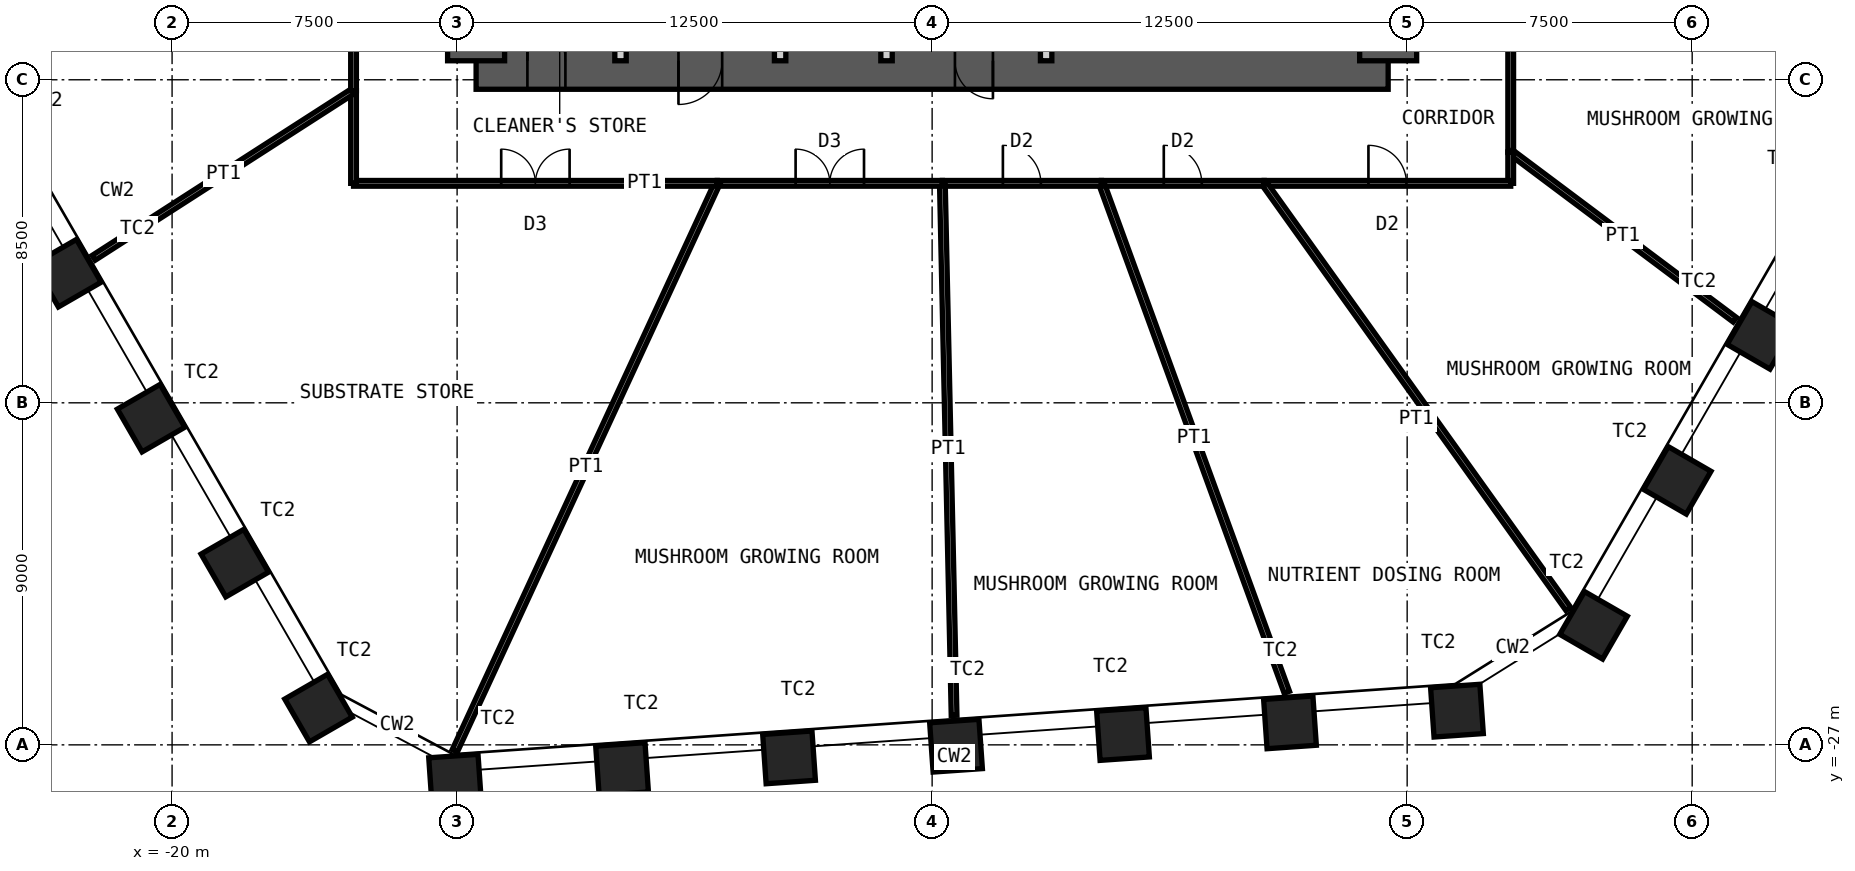
"""IFC4 building model, lengths in metres.
Left out: names, types, materials, properties, quantities, classifications, styles, units other than length and angle.
Written with IfcOpenShell. Run it as: python <this file> out.ifc"""

import sys

from ifc_helpers import new_model, si_unit, direction, frame, frame_2d, origin, origin_2d, place, context, subcontext, project, spatial, rectangle, hollow_rectangle, extrude, element, fill, save


model = new_model("IFC4")
c1 = context("Model", 3, precision=1e-05, world=origin(), true_north=direction((0.0, 1.0)))
c2 = subcontext(c1, "Body", "Model", "MODEL_VIEW")
j1 = project(units=[si_unit("LENGTHUNIT", "METRE"), si_unit("PLANEANGLEUNIT", "RADIAN")], contexts=[c1])
p1 = place(None, origin())
s1 = spatial("IfcSite", under=j1, at=p1, CompositionType="ELEMENT")
p2 = place(p1, origin())
s2 = spatial("IfcBuilding", under=s1, at=p2, CompositionType="ELEMENT")
p3 = place(p2, frame((0.0, 0.0, 62.0)))
s3 = spatial("IfcBuildingStorey", under=s2, at=p3, CompositionType="ELEMENT", Elevation=62.0)
for number, where, z_axis, x_axis in (
    (1, (21.809, -16.225, 0.0), (0.0, 0.0, 1.0), (0.5, 0.866, 0.0)),
    (2, (19.607, -20.04, 0.0), (0.0, 0.0, 1.0), (0.5, 0.866, 0.0)),
    (3, (17.405, -23.854, 0.0), (0.0, 0.0, 1.0), (0.5, 0.866, 0.0)),
    (4, (13.811, -26.1, 0.0), (0.0, 0.0, 1.0), (0.998, 0.07, 0.0)),
    (5, (9.417, -26.407, 0.0), (0.0, 0.0, 1.0), (0.998, 0.07, 0.0)),
    (6, (5.023, -26.715, 0.0), (0.0, 0.0, 1.0), (0.998, 0.07, 0.0)),
    (7, (0.629, -27.022, 0.0), (0.0, 0.0, 1.0), (0.998, 0.07, 0.0)),
    (8, (-3.765, -27.329, 0.0), (0.0, 0.0, 1.0), (0.998, 0.07, 0.0)),
    (9, (-8.159, -27.636, 0.0), (0.0, 0.0, 1.0), (0.998, 0.07, 0.0)),
    (10, (-12.553, -27.944, 0.0), (0.0, 0.0, 1.0), (0.998, 0.07, 0.0)),
    (11, (-16.147, -26.033, 0.0), (0.0, 0.0, 1.0), (0.5, -0.866, 0.0)),
    (12, (-18.349, -22.218, 0.0), (0.0, 0.0, 1.0), (0.5, -0.866, 0.0)),
    (13, (-20.552, -18.404, 0.0), (0.0, 0.0, 1.0), (0.5, -0.866, 0.0)),
    (14, (-22.754, -14.589, 0.0), (0.0, 0.0, 1.0), (0.5, -0.866, 0.0)),
):
    element("IfcColumn", number, at=place(p3, frame(where, z_axis=z_axis, x_axis=x_axis)), inside=s3, PredefinedType="COLUMN", context=c2, shape_type="SweptSolid", body=[
        extrude(hollow_rectangle(XDim=1.3, YDim=1.3, WallThickness=0.1, at=origin_2d()), origin(), (0.0, 0.0, 1.0), 5.0),
    ])
p4 = place(p3, frame((-12.0, -9.0, 0.0), z_axis=(0.0, 0.0, 1.0), x_axis=(1.0, 0.0, 0.0)))
e15 = element("IfcWall", 15, at=p4, inside=s3, PredefinedType="SHEAR", context=c2, shape_type="SweptSolid", body=[
    extrude(rectangle(XDim=24.0, YDim=1.5, at=frame_2d((12.0, 0.0))), origin(), (0.0, 0.0, 1.0), 5.0),
])
p5 = place(p4, frame((1.35, 0.0, 0.0)))
e16 = element("IfcOpeningElement", 16, at=p5, cuts=e15, PredefinedType="OPENING", context=c2, shape_type="SweptSolid", body=[
    extrude(rectangle(XDim=1.0, YDim=2.1, at=frame_2d((0.5, 1.05))), frame((0.0, 0.76, 0.0), z_axis=(0.0, -1.0, 0.0), x_axis=(1.0, 0.0, 0.0)), (0.0, 0.0, 1.0), 1.52),
])
p6 = place(p4, frame((5.325, 0.0, 0.0)))
e17 = element("IfcOpeningElement", 17, at=p6, cuts=e15, PredefinedType="OPENING", context=c2, shape_type="SweptSolid", body=[
    extrude(rectangle(XDim=1.15, YDim=2.1, at=frame_2d((0.575, 1.05))), frame((0.0, 0.76, 0.0), z_axis=(0.0, -1.0, 0.0), x_axis=(1.0, 0.0, 0.0)), (0.0, 0.0, 1.0), 1.52),
])
p7 = place(p4, frame((12.6, 0.0, 0.0)))
e18 = element("IfcOpeningElement", 18, at=p7, cuts=e15, PredefinedType="OPENING", context=c2, shape_type="SweptSolid", body=[
    extrude(rectangle(XDim=1.0, YDim=2.1, at=frame_2d((0.5, 1.05))), frame((0.0, 0.76, 0.0), z_axis=(0.0, -1.0, 0.0), x_axis=(1.0, 0.0, 0.0)), (0.0, 0.0, 1.0), 1.52),
])
p8 = place(p3, frame((12.0, -9.0, 0.0), z_axis=(0.0, 0.0, 1.0), x_axis=(0.0, 1.0, 0.0)))
e19 = element("IfcWall", 19, at=p8, inside=s3, PredefinedType="SHEAR", context=c2, shape_type="SweptSolid", body=[
    extrude(rectangle(XDim=18.0, YDim=1.5, at=frame_2d((9.0, 0.0))), origin(), (0.0, 0.0, 1.0), 5.0),
])
p9 = place(p8, frame((8.1, 0.0, 0.0)))
e20 = element("IfcOpeningElement", 20, at=p9, cuts=e19, PredefinedType="OPENING", context=c2, shape_type="SweptSolid", body=[
    extrude(rectangle(XDim=1.8, YDim=2.1, at=frame_2d((0.9, 1.05))), frame((0.0, 0.76, 0.0), z_axis=(0.0, -1.0, 0.0), x_axis=(1.0, 0.0, 0.0)), (0.0, 0.0, 1.0), 1.52),
])
p10 = place(p3, frame((-12.0, -9.0, 0.0), z_axis=(0.0, 0.0, 1.0), x_axis=(0.0, 1.0, 0.0)))
e21 = element("IfcWall", 21, at=p10, inside=s3, PredefinedType="SHEAR", context=c2, shape_type="SweptSolid", body=[
    extrude(rectangle(XDim=18.0, YDim=1.5, at=frame_2d((9.0, 0.0))), origin(), (0.0, 0.0, 1.0), 5.0),
])
p11 = place(p10, frame((8.1, 0.0, 0.0)))
e22 = element("IfcOpeningElement", 22, at=p11, cuts=e21, PredefinedType="OPENING", context=c2, shape_type="SweptSolid", body=[
    extrude(rectangle(XDim=1.8, YDim=2.1, at=frame_2d((0.9, 1.05))), frame((0.0, 0.76, 0.0), z_axis=(0.0, -1.0, 0.0), x_axis=(1.0, 0.0, 0.0)), (0.0, 0.0, 1.0), 1.52),
])
for number, where, z_axis, x_axis in (
    (23, (-8.2, -9.0, 0.0), (0.0, 0.0, 1.0), (0.0, 1.0, 0.0)),
    (24, (-4.0, -9.0, 0.0), (0.0, 0.0, 1.0), (0.0, 1.0, 0.0)),
):
    element("IfcWall", number, at=place(p3, frame(where, z_axis=z_axis, x_axis=x_axis)), inside=s3, PredefinedType="PARTITIONING", context=c2, shape_type="SweptSolid", body=[
        extrude(rectangle(XDim=3.85, YDim=0.3, at=frame_2d((1.925, 0.0))), origin(), (0.0, 0.0, 1.0), 4.78),
    ])
p12 = place(p3, frame((-1.2, -9.0, 0.0), z_axis=(0.0, 0.0, 1.0), x_axis=(0.0, 1.0, 0.0)))
e25 = element("IfcWall", 25, at=p12, inside=s3, PredefinedType="PARTITIONING", context=c2, shape_type="SweptSolid", body=[
    extrude(rectangle(XDim=3.85, YDim=0.3, at=frame_2d((1.925, 0.0))), origin(), (0.0, 0.0, 1.0), 4.78),
])
p13 = place(p12, frame((1.375, 0.0, 0.0)))
e26 = element("IfcOpeningElement", 26, at=p13, cuts=e25, PredefinedType="OPENING", context=c2, shape_type="SweptSolid", body=[
    extrude(rectangle(XDim=1.1, YDim=2.4, at=frame_2d((0.55, 1.2))), frame((0.0, 0.16, 0.0), z_axis=(0.0, -1.0, 0.0), x_axis=(1.0, 0.0, 0.0)), (0.0, 0.0, 1.0), 0.32),
])
p14 = place(p3, frame((3.0, -9.0, 0.0), z_axis=(0.0, 0.0, 1.0), x_axis=(0.0, 1.0, 0.0)))
e27 = element("IfcWall", 27, at=p14, inside=s3, PredefinedType="PARTITIONING", context=c2, shape_type="SweptSolid", body=[
    extrude(rectangle(XDim=3.85, YDim=0.3, at=frame_2d((1.925, 0.0))), origin(), (0.0, 0.0, 1.0), 4.78),
])
p15 = place(p14, frame((1.425, 0.0, 0.0)))
e28 = element("IfcOpeningElement", 28, at=p15, cuts=e27, PredefinedType="OPENING", context=c2, shape_type="SweptSolid", body=[
    extrude(rectangle(XDim=1.0, YDim=2.1, at=frame_2d((0.5, 1.05))), frame((0.0, 0.16, 0.0), z_axis=(0.0, -1.0, 0.0), x_axis=(1.0, 0.0, 0.0)), (0.0, 0.0, 1.0), 0.32),
])
p16 = place(p3, frame((15.225, -4.903, 0.0), z_axis=(0.0, 0.0, 1.0), x_axis=(0.0, -1.0, 0.0)))
e29 = element("IfcWall", 29, at=p16, inside=s3, PredefinedType="PARTITIONING", context=c2, shape_type="SweptSolid", body=[
    extrude(rectangle(XDim=6.497, YDim=0.15, at=frame_2d((3.248, 0.0))), origin(), (0.0, 0.0, 1.0), 4.8),
])
p17 = place(p16, frame((2.748, 0.0, 0.0)))
e30 = element("IfcOpeningElement", 30, at=p17, cuts=e29, PredefinedType="OPENING", context=c2, shape_type="SweptSolid", body=[
    extrude(rectangle(XDim=1.0, YDim=2.4, at=frame_2d((0.5, 1.2))), frame((0.0, 0.085, 0.0), z_axis=(0.0, -1.0, 0.0), x_axis=(1.0, 0.0, 0.0)), (0.0, 0.0, 1.0), 0.17),
])
p18 = place(p3, frame((21.123, -15.815, 0.0), z_axis=(0.0, 0.0, 1.0), x_axis=(-0.800484840692, 0.599353001012, 0.0)))
e31 = element("IfcWall", 31, at=p18, inside=s3, PredefinedType="PARTITIONING", context=c2, shape_type="SweptSolid", body=[
    extrude(rectangle(XDim=7.368, YDim=0.15, at=frame_2d((3.684, 0.0))), origin(), (0.0, 0.0, 1.0), 3.7),
])
p19 = place(p3, frame((15.225, -11.399, 0.0), z_axis=(0.0, 0.0, 1.0), x_axis=(0.0, -1.0, 0.0)))
e32 = element("IfcWall", 32, at=p19, inside=s3, PredefinedType="PARTITIONING", context=c2, shape_type="SweptSolid", body=[
    extrude(rectangle(XDim=0.826, YDim=0.15, at=frame_2d((0.413, 0.0))), origin(), (0.0, 0.0, 1.0), 4.8),
])
p20 = place(p3, frame((15.225, -12.225, 0.0), z_axis=(0.0, 0.0, 1.0), x_axis=(-1.0, 0.0, 0.0)))
e33 = element("IfcWall", 33, at=p20, inside=s3, PredefinedType="PARTITIONING", context=c2, shape_type="SweptSolid", body=[
    extrude(rectangle(XDim=6.488, YDim=0.15, at=frame_2d((3.244, 0.0))), origin(), (0.0, 0.0, 1.0), 4.8),
])
p21 = place(p20, frame((2.744, 0.0, 0.0)))
e34 = element("IfcOpeningElement", 34, at=p21, cuts=e33, PredefinedType="OPENING", context=c2, shape_type="SweptSolid", body=[
    extrude(rectangle(XDim=1.0, YDim=2.4, at=frame_2d((0.5, 1.2))), frame((0.0, 0.085, 0.0), z_axis=(0.0, -1.0, 0.0), x_axis=(1.0, 0.0, 0.0)), (0.0, 0.0, 1.0), 0.17),
])
p22 = place(p3, frame((16.74, -23.423, 0.0), z_axis=(0.0, 0.0, 1.0), x_axis=(-0.581459653783, 0.813575239927, 0.0)))
e35 = element("IfcWall", 35, at=p22, inside=s3, PredefinedType="PARTITIONING", context=c2, shape_type="SweptSolid", body=[
    extrude(rectangle(XDim=13.764, YDim=0.15, at=frame_2d((6.882, 0.0))), origin(), (0.0, 0.0, 1.0), 3.7),
])
p23 = place(p3, frame((8.737, -12.225, 0.0), z_axis=(0.0, 0.0, 1.0), x_axis=(-1.0, 0.0, 0.0)))
e36 = element("IfcWall", 36, at=p23, inside=s3, PredefinedType="PARTITIONING", context=c2, shape_type="SweptSolid", body=[
    extrude(rectangle(XDim=4.282, YDim=0.15, at=frame_2d((2.141, 0.0))), origin(), (0.0, 0.0, 1.0), 4.8),
])
p24 = place(p23, frame((1.641, 0.0, 0.0)))
e37 = element("IfcOpeningElement", 37, at=p24, cuts=e36, PredefinedType="OPENING", context=c2, shape_type="SweptSolid", body=[
    extrude(rectangle(XDim=1.0, YDim=2.4, at=frame_2d((0.5, 1.2))), frame((0.0, 0.085, 0.0), z_axis=(0.0, -1.0, 0.0), x_axis=(1.0, 0.0, 0.0)), (0.0, 0.0, 1.0), 0.17),
])
p25 = place(p3, frame((9.333, -25.615, 0.0), z_axis=(0.0, 0.0, 1.0), x_axis=(-0.342348208267, 0.939573150051, 0.0)))
e38 = element("IfcWall", 38, at=p25, inside=s3, PredefinedType="PARTITIONING", context=c2, shape_type="SweptSolid", body=[
    extrude(rectangle(XDim=14.251, YDim=0.15, at=frame_2d((7.125, 0.0))), origin(), (0.0, 0.0, 1.0), 3.7),
])
p26 = place(p3, frame((4.455, -12.225, 0.0), z_axis=(0.0, 0.0, 1.0), x_axis=(-1.0, 0.0, 0.0)))
e39 = element("IfcWall", 39, at=p26, inside=s3, PredefinedType="PARTITIONING", context=c2, shape_type="SweptSolid", body=[
    extrude(rectangle(XDim=4.185, YDim=0.15, at=frame_2d((2.093, 0.0))), origin(), (0.0, 0.0, 1.0), 4.8),
])
p27 = place(p26, frame((1.593, 0.0, 0.0)))
e40 = element("IfcOpeningElement", 40, at=p27, cuts=e39, PredefinedType="OPENING", context=c2, shape_type="SweptSolid", body=[
    extrude(rectangle(XDim=1.0, YDim=2.4, at=frame_2d((0.5, 1.2))), frame((0.0, 0.085, 0.0), z_axis=(0.0, -1.0, 0.0), x_axis=(1.0, 0.0, 0.0)), (0.0, 0.0, 1.0), 0.17),
])
p28 = place(p3, frame((0.578, -26.224, 0.0), z_axis=(0.0, 0.0, 1.0), x_axis=(-0.022039362711, 0.999757103746, 0.0)))
e41 = element("IfcWall", 41, at=p28, inside=s3, PredefinedType="PARTITIONING", context=c2, shape_type="SweptSolid", body=[
    extrude(rectangle(XDim=14.002, YDim=0.15, at=frame_2d((7.001, 0.0))), origin(), (0.0, 0.0, 1.0), 3.7),
])
p29 = place(p3, frame((0.269, -12.225, 0.0), z_axis=(0.0, 0.0, 1.0), x_axis=(-1.0, 0.0, 0.0)))
e42 = element("IfcWall", 42, at=p29, inside=s3, PredefinedType="PARTITIONING", context=c2, shape_type="SweptSolid", body=[
    extrude(rectangle(XDim=5.924, YDim=0.15, at=frame_2d((2.962, 0.0))), origin(), (0.0, 0.0, 1.0), 4.8),
])
p30 = place(p29, frame((2.062, 0.0, 0.0)))
e43 = element("IfcOpeningElement", 43, at=p30, cuts=e42, PredefinedType="OPENING", context=c2, shape_type="SweptSolid", body=[
    extrude(rectangle(XDim=1.8, YDim=2.4, at=frame_2d((0.9, 1.2))), frame((0.0, 0.085, 0.0), z_axis=(0.0, -1.0, 0.0), x_axis=(1.0, 0.0, 0.0)), (0.0, 0.0, 1.0), 0.17),
])
p31 = place(p3, frame((-12.56, -27.155, 0.0), z_axis=(0.0, 0.0, 1.0), x_axis=(0.419797833376, 0.907617639258, 0.0)))
e44 = element("IfcWall", 44, at=p31, inside=s3, PredefinedType="PARTITIONING", context=c2, shape_type="SweptSolid", body=[
    extrude(rectangle(XDim=16.449, YDim=0.15, at=frame_2d((8.225, 0.0))), origin(), (0.0, 0.0, 1.0), 3.7),
])
p32 = place(p3, frame((-5.654, -12.225, 0.0), z_axis=(0.0, 0.0, 1.0), x_axis=(-1.0, 0.0, 0.0)))
e45 = element("IfcWall", 45, at=p32, inside=s3, PredefinedType="PARTITIONING", context=c2, shape_type="SweptSolid", body=[
    extrude(rectangle(XDim=9.571, YDim=0.15, at=frame_2d((4.785, 0.0))), origin(), (0.0, 0.0, 1.0), 4.8),
])
p33 = place(p32, frame((3.885, 0.0, 0.0)))
e46 = element("IfcOpeningElement", 46, at=p33, cuts=e45, PredefinedType="OPENING", context=c2, shape_type="SweptSolid", body=[
    extrude(rectangle(XDim=1.8, YDim=2.4, at=frame_2d((0.9, 1.2))), frame((0.0, 0.085, 0.0), z_axis=(0.0, -1.0, 0.0), x_axis=(1.0, 0.0, 0.0)), (0.0, 0.0, 1.0), 0.17),
])
p34 = place(p3, frame((-15.225, -12.225, 0.0), z_axis=(0.0, 0.0, 1.0), x_axis=(0.0, 1.0, 0.0)))
e47 = element("IfcWall", 47, at=p34, inside=s3, PredefinedType="PARTITIONING", context=c2, shape_type="SweptSolid", body=[
    extrude(rectangle(XDim=2.437, YDim=0.15, at=frame_2d((1.218, 0.0))), origin(), (0.0, 0.0, 1.0), 4.8),
])
p35 = place(p3, frame((-22.063, -14.185, 0.0), z_axis=(0.0, 0.0, 1.0), x_axis=(0.8411570088, 0.540790982309, 0.0)))
e48 = element("IfcWall", 48, at=p35, inside=s3, PredefinedType="PARTITIONING", context=c2, shape_type="SweptSolid", body=[
    extrude(rectangle(XDim=8.13, YDim=0.15, at=frame_2d((4.065, 0.0))), origin(), (0.0, 0.0, 1.0), 3.7),
])
p36 = place(p3, frame((-15.225, -9.789, 0.0), z_axis=(0.0, 0.0, 1.0), x_axis=(0.0, 1.0, 0.0)))
e49 = element("IfcWall", 49, at=p36, inside=s3, PredefinedType="PARTITIONING", context=c2, shape_type="SweptSolid", body=[
    extrude(rectangle(XDim=8.308, YDim=0.15, at=frame_2d((4.154, 0.0))), origin(), (0.0, 0.0, 1.0), 4.8),
])
p37 = place(p36, frame((3.254, 0.0, 0.0)))
e50 = element("IfcOpeningElement", 50, at=p37, cuts=e49, PredefinedType="OPENING", context=c2, shape_type="SweptSolid", body=[
    extrude(rectangle(XDim=1.8, YDim=2.4, at=frame_2d((0.9, 1.2))), frame((0.0, 0.085, 0.0), z_axis=(0.0, -1.0, 0.0), x_axis=(1.0, 0.0, 0.0)), (0.0, 0.0, 1.0), 0.17),
])
p38 = place(p5, origin())
e51 = element("IfcDoor", 51, at=p38, inside=s3, OperationType="SINGLE_SWING_RIGHT", PredefinedType="DOOR", context=c2, shape_type="SweptSolid", body=[
    extrude(rectangle(XDim=1.0, YDim=2.1, at=frame_2d((0.5, 1.05))), frame((0.0, 0.025, 0.0), z_axis=(0.0, -1.0, 0.0), x_axis=(1.0, 0.0, 0.0)), (0.0, 0.0, 1.0), 0.05),
])
fill(e16, e51)
p39 = place(p6, origin())
e52 = element("IfcDoor", 52, at=p39, inside=s3, OperationType="SINGLE_SWING_LEFT", PredefinedType="DOOR", context=c2, shape_type="SweptSolid", body=[
    extrude(rectangle(XDim=1.15, YDim=2.1, at=frame_2d((0.575, 1.05))), frame((0.0, 0.025, 0.0), z_axis=(0.0, -1.0, 0.0), x_axis=(1.0, 0.0, 0.0)), (0.0, 0.0, 1.0), 0.05),
])
fill(e17, e52)
p40 = place(p7, origin())
e53 = element("IfcDoor", 53, at=p40, inside=s3, OperationType="SINGLE_SWING_RIGHT", PredefinedType="DOOR", context=c2, shape_type="SweptSolid", body=[
    extrude(rectangle(XDim=1.0, YDim=2.1, at=frame_2d((0.5, 1.05))), frame((0.0, 0.025, 0.0), z_axis=(0.0, -1.0, 0.0), x_axis=(1.0, 0.0, 0.0)), (0.0, 0.0, 1.0), 0.05),
])
fill(e18, e53)
p41 = place(p21, origin())
e54 = element("IfcDoor", 54, at=p41, inside=s3, OperationType="SINGLE_SWING_RIGHT", PredefinedType="DOOR", context=c2, shape_type="SweptSolid", body=[
    extrude(rectangle(XDim=1.0, YDim=2.4, at=frame_2d((0.5, 1.2))), frame((0.0, 0.025, 0.0), z_axis=(0.0, -1.0, 0.0), x_axis=(1.0, 0.0, 0.0)), (0.0, 0.0, 1.0), 0.05),
])
fill(e34, e54)
p42 = place(p24, origin())
e55 = element("IfcDoor", 55, at=p42, inside=s3, OperationType="SINGLE_SWING_RIGHT", PredefinedType="DOOR", context=c2, shape_type="SweptSolid", body=[
    extrude(rectangle(XDim=1.0, YDim=2.4, at=frame_2d((0.5, 1.2))), frame((0.0, 0.025, 0.0), z_axis=(0.0, -1.0, 0.0), x_axis=(1.0, 0.0, 0.0)), (0.0, 0.0, 1.0), 0.05),
])
fill(e37, e55)
p43 = place(p27, origin())
e56 = element("IfcDoor", 56, at=p43, inside=s3, OperationType="SINGLE_SWING_RIGHT", PredefinedType="DOOR", context=c2, shape_type="SweptSolid", body=[
    extrude(rectangle(XDim=1.0, YDim=2.4, at=frame_2d((0.5, 1.2))), frame((0.0, 0.025, 0.0), z_axis=(0.0, -1.0, 0.0), x_axis=(1.0, 0.0, 0.0)), (0.0, 0.0, 1.0), 0.05),
])
fill(e40, e56)
p44 = place(p30, origin())
e57 = element("IfcDoor", 57, at=p44, inside=s3, OperationType="DOUBLE_DOOR_DOUBLE_SWING", PredefinedType="DOOR", context=c2, shape_type="SweptSolid", body=[
    extrude(rectangle(XDim=1.8, YDim=2.4, at=frame_2d((0.9, 1.2))), frame((0.0, 0.025, 0.0), z_axis=(0.0, -1.0, 0.0), x_axis=(1.0, 0.0, 0.0)), (0.0, 0.0, 1.0), 0.05),
])
fill(e43, e57)
p45 = place(p33, origin())
e58 = element("IfcDoor", 58, at=p45, inside=s3, OperationType="DOUBLE_DOOR_DOUBLE_SWING", PredefinedType="DOOR", context=c2, shape_type="SweptSolid", body=[
    extrude(rectangle(XDim=1.8, YDim=2.4, at=frame_2d((0.9, 1.2))), frame((0.0, 0.025, 0.0), z_axis=(0.0, -1.0, 0.0), x_axis=(1.0, 0.0, 0.0)), (0.0, 0.0, 1.0), 0.05),
])
fill(e46, e58)
save(model, sys.argv[1])
